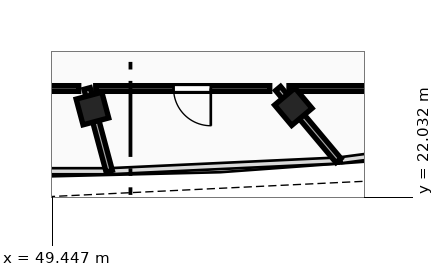
"""IFC4 building model, lengths in metres.
Left out: names, types, materials, properties, quantities, classifications, styles, units other than length and angle.
Written with IfcOpenShell. Run it as: python <this file> out.ifc"""

import sys

from ifc_helpers import new_model, si_unit, direction, frame, frame_2d, origin, origin_with_axes, origin_2d, place, context, subcontext, project, spatial, rectangle, hollow_rectangle, extrude, source, transform, mapped, element, fill, save


model = new_model("IFC4")
c1 = context("Model", 3, precision=1e-05, world=origin(), true_north=direction((0.0, 1.0)))
c2 = subcontext(c1, "Body", "Model", "MODEL_VIEW")
j1 = project(units=[si_unit("LENGTHUNIT", "METRE"), si_unit("PLANEANGLEUNIT", "RADIAN")], contexts=[c1])
p1 = place(None, origin())
s1 = spatial("IfcSite", under=j1, at=p1, CompositionType="ELEMENT")
p2 = place(p1, origin())
s2 = spatial("IfcBuilding", under=s1, at=p2, CompositionType="ELEMENT")
p3 = place(p2, frame((0.0, 0.0, 359.26)))
s3 = spatial("IfcBuildingStorey", under=s2, at=p3, CompositionType="ELEMENT", Elevation=359.26)
m1 = source(origin(), c2, "Body", "SweptSolid", [
    extrude(hollow_rectangle(XDim=0.7, YDim=0.7, WallThickness=0.026, at=origin_2d()), origin(), (0.0, 0.0, 1.0), 3.75),
])
for number, where, z_axis, x_axis in (
    (1, (50.499, 24.373, -0.26), (0.0, 0.0, 1.0), (0.966, 0.259, 0.0)),
    (2, (55.785, 24.422, -0.26), (0.0, 0.0, 1.0), (0.766, 0.643, 0.0)),
):
    element("IfcColumn", number, at=place(p3, frame(where, z_axis=z_axis, x_axis=x_axis)), inside=s3, PredefinedType="COLUMN", context=c2, shape_type="MappedRepresentation", body=[
        mapped(m1, transform((0.0, 0.0, 0.0), scale=1.0)),
    ])
p4 = place(p3, frame((50.358, 24.9, 0.0), z_axis=(0.0, 0.0, 1.0), x_axis=(0.258842593831, -0.965919516119, 0.0)))
e3 = element("IfcWall", 3, at=p4, inside=s3, PredefinedType="PARTITIONING", context=c2, shape_type="SweptSolid", body=[
    extrude(rectangle(XDim=2.253, YDim=0.17, at=frame_2d((1.127, 0.0))), origin(), (0.0, 0.0, 1.0), 2.89),
])
p5 = place(p3, frame((55.384, 24.9, 0.0), z_axis=(0.0, 0.0, 1.0), x_axis=(0.642821604445, -0.766015916844, 0.0)))
e4 = element("IfcWall", 4, at=p5, inside=s3, PredefinedType="PARTITIONING", context=c2, shape_type="SweptSolid", body=[
    extrude(rectangle(XDim=2.473, YDim=0.17, at=frame_2d((1.237, 0.0))), origin(), (0.0, 0.0, 1.0), 2.89),
])
p6 = place(p3, frame((62.85, 24.9, 0.0), z_axis=(0.0, 0.0, 1.0), x_axis=(-1.0, 0.0, 0.0)))
e5 = element("IfcWall", 5, at=p6, inside=s3, PredefinedType="PARTITIONING", context=c2, shape_type="SweptSolid", body=[
    extrude(rectangle(XDim=7.179, YDim=0.15, at=frame_2d((3.589, 0.0))), origin(), (0.0, 0.0, 1.0), 2.89),
])
p7 = place(p6, frame((2.25, 0.0, 0.0)))
e6 = element("IfcOpeningElement", 6, at=p7, cuts=e5, PredefinedType="OPENING", context=c2, shape_type="SweptSolid", body=[
    extrude(rectangle(XDim=0.98, YDim=2.12, at=frame_2d((0.49, 1.06))), frame((0.0, 0.085, 0.0), z_axis=(0.0, -1.0, 0.0), x_axis=(1.0, 0.0, 0.0)), (0.0, 0.0, 1.0), 0.17),
])
p8 = place(p3, frame((55.164, 24.9, 0.0), z_axis=(0.0, 0.0, 1.0), x_axis=(-1.0, 0.0, 0.0)))
e7 = element("IfcWall", 7, at=p8, inside=s3, PredefinedType="PARTITIONING", context=c2, shape_type="SweptSolid", body=[
    extrude(rectangle(XDim=4.579, YDim=0.15, at=frame_2d((2.289, 0.0))), origin(), (0.0, 0.0, 1.0), 3.49),
])
p9 = place(p8, frame((1.55, 0.0, 0.0)))
e8 = element("IfcOpeningElement", 8, at=p9, cuts=e7, PredefinedType="OPENING", context=c2, shape_type="SweptSolid", body=[
    extrude(rectangle(XDim=0.98, YDim=2.12, at=frame_2d((0.49, 1.06))), frame((0.0, 0.085, 0.0), z_axis=(0.0, -1.0, 0.0), x_axis=(1.0, 0.0, 0.0)), (0.0, 0.0, 1.0), 0.17),
])
p10 = place(p3, frame((50.138, 24.9, 0.0), z_axis=(0.0, 0.0, 1.0), x_axis=(-1.0, 0.0, 0.0)))
e9 = element("IfcWall", 9, at=p10, inside=s3, PredefinedType="PARTITIONING", context=c2, shape_type="SweptSolid", body=[
    extrude(rectangle(XDim=1.918, YDim=0.15, at=frame_2d((0.959, 0.0))), origin(), (0.0, 0.0, 1.0), 3.49),
])
m2 = source(origin(), c2, "Body", "SweptSolid", [
    extrude(rectangle(XDim=0.98, YDim=2.12, at=frame_2d((0.49, 1.06))), frame((0.0, 0.025, 0.0), z_axis=(0.0, -1.0, 0.0), x_axis=(1.0, 0.0, 0.0)), (0.0, 0.0, 1.0), 0.05),
])
p11 = place(p9, origin_with_axes())
e10 = element("IfcDoor", 10, at=p11, inside=s3, OperationType="SINGLE_SWING_LEFT", PredefinedType="DOOR", context=c2, shape_type="MappedRepresentation", body=[
    mapped(m2, transform((0.0, 0.0, 0.0), scale=1.0)),
])
fill(e8, e10)
save(model, sys.argv[1])
